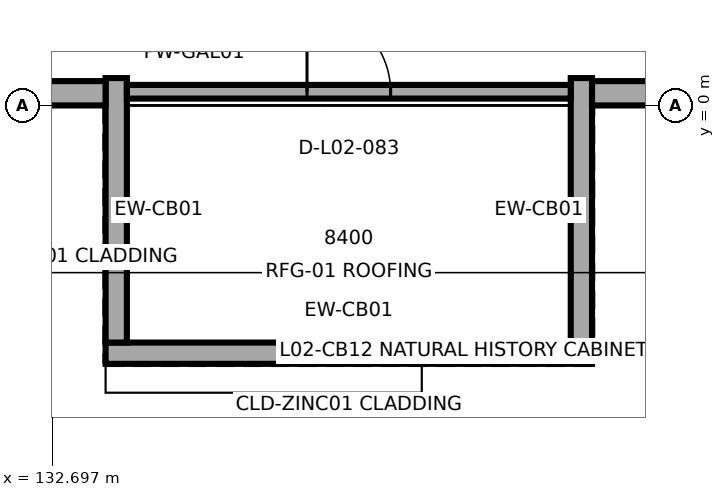
"""IFC4 building model, lengths in metres.
Left out: names, types, materials, properties, quantities, classifications, styles, units other than length and angle.
Written with IfcOpenShell. Run it as: python <this file> out.ifc"""

import sys

from ifc_helpers import new_model, si_unit, direction, frame, frame_2d, origin, place, context, subcontext, project, spatial, rectangle, extrude, element, fill, save


model = new_model("IFC4")
c1 = context("Model", 3, precision=1e-05, world=origin(), true_north=direction((0.0, 1.0)))
c2 = subcontext(c1, "Body", "Model", "MODEL_VIEW")
j1 = project(units=[si_unit("LENGTHUNIT", "METRE"), si_unit("PLANEANGLEUNIT", "RADIAN")], contexts=[c1])
p1 = place(None, origin())
s1 = spatial("IfcSite", under=j1, at=p1, CompositionType="ELEMENT")
p2 = place(p1, origin())
s2 = spatial("IfcBuilding", under=s1, at=p2, CompositionType="ELEMENT")
p3 = place(p2, frame((0.0, 0.0, 12.9)))
s3 = spatial("IfcBuildingStorey", under=s2, at=p3, CompositionType="ELEMENT", Elevation=12.9)
p4 = place(p3, frame((133.4, -3.26, 0.0), z_axis=(0.0, 0.0, 1.0), x_axis=(1.0, 0.0, 0.0)))
e1 = element("IfcWall", 1, at=p4, inside=s3, PredefinedType="SOLIDWALL", context=c2, shape_type="SweptSolid", body=[
    extrude(rectangle(XDim=6.4, YDim=0.28, at=frame_2d((3.2, 0.0))), origin(), (0.0, 0.0, 1.0), 2.99),
])
for number, where, z_axis, x_axis in (
    (2, (133.54, 0.36, 0.0), (0.0, 0.0, 1.0), (0.0, -1.0, 0.0)),
    (3, (139.66, -3.12, 0.0), (0.0, 0.0, 1.0), (0.0, 1.0, 0.0)),
):
    element("IfcWall", number, at=place(p3, frame(where, z_axis=z_axis, x_axis=x_axis)), inside=s3, PredefinedType="SOLIDWALL", context=c2, shape_type="SweptSolid", body=[
        extrude(rectangle(XDim=3.48, YDim=0.28, at=frame_2d((1.74, 0.0))), origin(), (0.0, 0.0, 1.0), 2.99),
    ])
for number, where, z_axis, x_axis in (
    (4, (132.55, 0.16, 0.0), (0.0, 0.0, 1.0), (1.0, 0.0, 0.0)),
    (5, (139.8, 0.16, 0.0), (0.0, 0.0, 1.0), (1.0, 0.0, 0.0)),
):
    element("IfcWall", number, at=place(p3, frame(where, z_axis=z_axis, x_axis=x_axis)), inside=s3, PredefinedType="SOLIDWALL", context=c2, shape_type="SweptSolid", body=[
        extrude(rectangle(XDim=0.85, YDim=0.32, at=frame_2d((0.425, 0.0))), origin(), (0.0, 0.0, 1.0), 3.88),
    ])
p5 = place(p3, frame((133.68, 0.18, 0.0), z_axis=(0.0, 0.0, 1.0), x_axis=(1.0, 0.0, 0.0)))
e6 = element("IfcWall", 6, at=p5, inside=s3, PredefinedType="PARTITIONING", context=c2, shape_type="SweptSolid", body=[
    extrude(rectangle(XDim=5.84, YDim=0.18, at=frame_2d((2.92, 0.0))), origin(), (0.0, 0.0, 1.0), 2.99),
])
p6 = place(p5, frame((2.37, 0.0, 0.0)))
e7 = element("IfcOpeningElement", 7, at=p6, cuts=e6, PredefinedType="OPENING", context=c2, shape_type="SweptSolid", body=[
    extrude(rectangle(XDim=1.1, YDim=2.2, at=frame_2d((0.55, 1.1))), frame((0.0, 0.1, 0.0), z_axis=(0.0, -1.0, 0.0), x_axis=(1.0, 0.0, 0.0)), (0.0, 0.0, 1.0), 0.2),
])
p7 = place(p6, origin())
e8 = element("IfcDoor", 8, at=p7, inside=s3, OperationType="SINGLE_SWING_LEFT", PredefinedType="DOOR", context=c2, shape_type="SweptSolid", body=[
    extrude(rectangle(XDim=1.1, YDim=2.2, at=frame_2d((0.55, 1.1))), frame((0.0, 0.025, 0.0), z_axis=(0.0, -1.0, 0.0), x_axis=(1.0, 0.0, 0.0)), (0.0, 0.0, 1.0), 0.05),
])
fill(e7, e8)
save(model, sys.argv[1])
